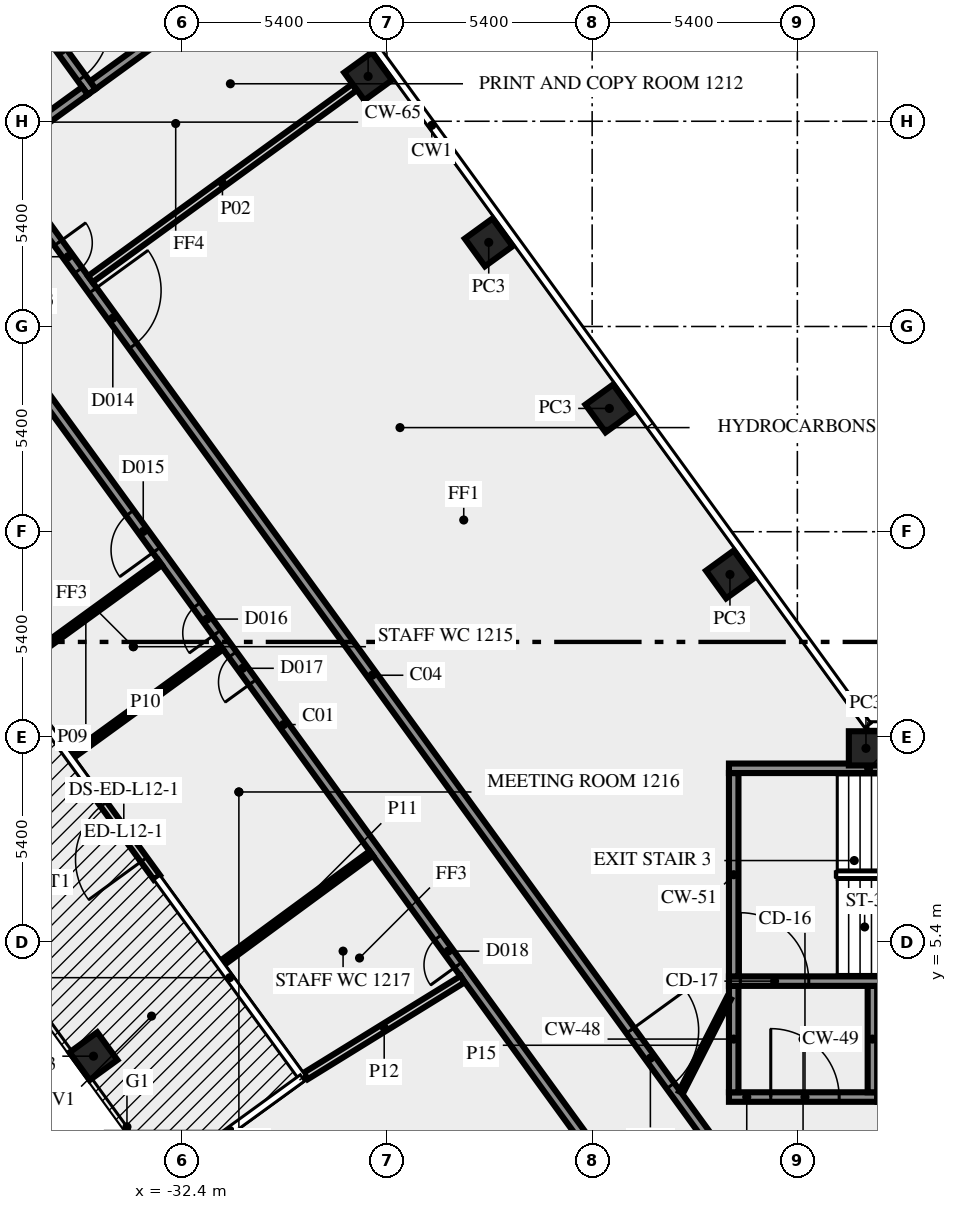
"""IFC4 building model, lengths in metres.
Left out: names, types, materials, properties, quantities, classifications, styles, units other than length and angle.
Written with IfcOpenShell. Run it as: python <this file> out.ifc"""

import sys

from ifc_helpers import new_model, si_unit, direction, frame, frame_2d, origin, origin_2d, place, context, subcontext, project, spatial, rectangle, extrude, element, fill, save


model = new_model("IFC4")
c1 = context("Model", 3, precision=1e-05, world=origin(), true_north=direction((0.0, 1.0)))
c2 = subcontext(c1, "Body", "Model", "MODEL_VIEW")
j1 = project(units=[si_unit("LENGTHUNIT", "METRE"), si_unit("PLANEANGLEUNIT", "RADIAN")], contexts=[c1])
p1 = place(None, origin())
s1 = spatial("IfcSite", under=j1, at=p1, CompositionType="ELEMENT")
p2 = place(p1, origin())
s2 = spatial("IfcBuilding", under=s1, at=p2, CompositionType="ELEMENT")
p3 = place(p2, frame((0.0, 0.0, 55.0)))
s3 = spatial("IfcBuildingStorey", under=s2, at=p3, CompositionType="ELEMENT", Elevation=55.0)
for number, where, z_axis, x_axis in (
    (1, (-17.974, 15.075, 0.0), (0.0, 0.0, 1.0), (-0.588, 0.809, 0.0)),
    (2, (-21.147, 19.444, 0.0), (0.0, 0.0, 1.0), (-0.588, 0.809, 0.0)),
    (3, (-24.321, 23.812, 0.0), (0.0, 0.0, 1.0), (-0.588, 0.809, 0.0)),
    (4, (-27.495, 28.181, 0.0), (0.0, 0.0, 1.0), (-0.588, 0.809, 0.0)),
    (5, (-34.722, 2.4, 0.0), (0.0, 0.0, 1.0), (0.588, -0.809, 0.0)),
    (6, (-14.395, 10.5, 0.0), (0.0, 0.0, 1.0), (-1.0, 0.0, 0.0)),
):
    element("IfcColumn", number, at=place(p3, frame(where, z_axis=z_axis, x_axis=x_axis)), inside=s3, PredefinedType="COLUMN", context=c2, shape_type="SweptSolid", body=[
        extrude(rectangle(XDim=0.9, YDim=0.9, at=origin_2d()), origin(), (0.0, 0.0, 1.0), 3.65),
    ])
p4 = place(p3, frame((-33.053, 7.103, 0.0), z_axis=(0.0, 0.0, 1.0), x_axis=(-0.587774760134, 0.809024617271, 0.0)))
e7 = element("IfcWall", 7, at=p4, inside=s3, PredefinedType="SOLIDWALL", context=c2, shape_type="SweptSolid", body=[
    extrude(rectangle(XDim=2.963, YDim=0.2, at=frame_2d((1.481, 0.0))), origin(), (0.0, 0.0, 1.0), 3.65),
])
p5 = place(p4, frame((0.582, 0.0, 0.0)))
e8 = element("IfcOpeningElement", 8, at=p5, cuts=e7, PredefinedType="OPENING", context=c2, shape_type="SweptSolid", body=[
    extrude(rectangle(XDim=1.8, YDim=2.4, at=frame_2d((0.9, 1.2))), frame((0.0, 0.11, 0.0), z_axis=(0.0, -1.0, 0.0), x_axis=(1.0, 0.0, 0.0)), (0.0, 0.0, 1.0), 0.22),
])
p6 = place(p3, frame((-18.0, 1.325, 0.0), z_axis=(0.0, 0.0, 1.0), x_axis=(1.0, 0.0, 0.0)))
e9 = element("IfcWall", 9, at=p6, inside=s3, PredefinedType="SHEAR", context=c2, shape_type="SweptSolid", body=[
    extrude(rectangle(XDim=3.9, YDim=0.25, at=frame_2d((1.95, 0.0))), origin(), (0.0, 0.0, 1.0), 3.65),
])
p7 = place(p6, frame((1.1, 0.0, 0.0)))
e10 = element("IfcOpeningElement", 10, at=p7, cuts=e9, PredefinedType="OPENING", context=c2, shape_type="SweptSolid", body=[
    extrude(rectangle(XDim=1.8, YDim=2.1, at=frame_2d((0.9, 1.05))), frame((0.0, 0.135, 0.0), z_axis=(0.0, -1.0, 0.0), x_axis=(1.0, 0.0, 0.0)), (0.0, 0.0, 1.0), 0.27),
])
for number, where, z_axis, x_axis in (
    (11, (-17.875, 1.45, 0.0), (0.0, 0.0, 1.0), (0.0, 1.0, 0.0)),
    (12, (-14.225, 1.45, 0.0), (0.0, 0.0, 1.0), (0.0, 1.0, 0.0)),
):
    element("IfcWall", number, at=place(p3, frame(where, z_axis=z_axis, x_axis=x_axis)), inside=s3, PredefinedType="SHEAR", context=c2, shape_type="SweptSolid", body=[
        extrude(rectangle(XDim=2.8, YDim=0.25, at=frame_2d((1.4, 0.0))), origin(), (0.0, 0.0, 1.0), 3.65),
    ])
p8 = place(p3, frame((-18.0, 4.375, 0.0), z_axis=(0.0, 0.0, 1.0), x_axis=(1.0, 0.0, 0.0)))
e13 = element("IfcWall", 13, at=p8, inside=s3, PredefinedType="SHEAR", context=c2, shape_type="SweptSolid", body=[
    extrude(rectangle(XDim=10.5, YDim=0.25, at=frame_2d((5.25, 0.0))), origin(), (0.0, 0.0, 1.0), 3.65),
])
p9 = place(p8, frame((0.3, 0.0, 0.0)))
e14 = element("IfcOpeningElement", 14, at=p9, cuts=e13, PredefinedType="OPENING", context=c2, shape_type="SweptSolid", body=[
    extrude(rectangle(XDim=1.8, YDim=2.1, at=frame_2d((0.9, 1.05))), frame((0.0, 0.135, 0.0), z_axis=(0.0, -1.0, 0.0), x_axis=(1.0, 0.0, 0.0)), (0.0, 0.0, 1.0), 0.27),
])
p10 = place(p3, frame((-17.875, 4.5, 0.0), z_axis=(0.0, 0.0, 1.0), x_axis=(0.0, 1.0, 0.0)))
e15 = element("IfcWall", 15, at=p10, inside=s3, PredefinedType="SHEAR", context=c2, shape_type="SweptSolid", body=[
    extrude(rectangle(XDim=5.35, YDim=0.25, at=frame_2d((2.675, 0.0))), origin(), (0.0, 0.0, 1.0), 3.65),
])
p11 = place(p3, frame((-18.0, 9.975, 0.0), z_axis=(0.0, 0.0, 1.0), x_axis=(1.0, 0.0, 0.0)))
e16 = element("IfcWall", 16, at=p11, inside=s3, PredefinedType="SHEAR", context=c2, shape_type="SweptSolid", body=[
    extrude(rectangle(XDim=10.5, YDim=0.25, at=frame_2d((5.25, 0.0))), origin(), (0.0, 0.0, 1.0), 3.65),
])
p12 = place(p11, frame((4.5, 0.0, 1.0)))
e17 = element("IfcOpeningElement", 17, at=p12, cuts=e16, PredefinedType="OPENING", context=c2, shape_type="SweptSolid", body=[
    extrude(rectangle(XDim=1.2, YDim=1.2, at=frame_2d((0.6, 0.6))), frame((0.0, 0.135, 0.0), z_axis=(0.0, -1.0, 0.0), x_axis=(1.0, 0.0, 0.0)), (0.0, 0.0, 1.0), 0.27),
])
p13 = place(p3, frame((-30.414, 31.092, 0.0), z_axis=(0.0, 0.0, 1.0), x_axis=(-0.8089984606, -0.587810760999, 0.0)))
e18 = element("IfcWall", 18, at=p13, inside=s3, PredefinedType="SHEAR", context=c2, shape_type="SweptSolid", body=[
    extrude(rectangle(XDim=5.35, YDim=0.25, at=frame_2d((2.675, 0.0))), origin(), (0.0, 0.0, 1.0), 3.65),
])
p14 = place(p3, frame((-40.942, 36.267, 0.0), z_axis=(0.0, 0.0, 1.0), x_axis=(0.587795589702, -0.809009483706, 0.0)))
e19 = element("IfcWall", 19, at=p14, inside=s3, PredefinedType="SHEAR", context=c2, shape_type="SweptSolid", body=[
    extrude(rectangle(XDim=10.5, YDim=0.25, at=frame_2d((5.25, 0.0))), origin(), (0.0, 0.0, 1.0), 3.65),
])
p15 = place(p14, frame((8.25, 0.0, 0.0)))
e20 = element("IfcOpeningElement", 20, at=p15, cuts=e19, PredefinedType="OPENING", context=c2, shape_type="SweptSolid", body=[
    extrude(rectangle(XDim=1.8, YDim=2.1, at=frame_2d((0.9, 1.05))), frame((0.0, 0.135, 0.0), z_axis=(0.0, -1.0, 0.0), x_axis=(1.0, 0.0, 0.0)), (0.0, 0.0, 1.0), 0.27),
])
p16 = place(p3, frame((-34.945, 27.8, 0.0), z_axis=(0.0, 0.0, 1.0), x_axis=(-0.809041377956, -0.587751689708, 0.0)))
e21 = element("IfcWall", 21, at=p16, inside=s3, PredefinedType="SHEAR", context=c2, shape_type="SweptSolid", body=[
    extrude(rectangle(XDim=2.8, YDim=0.25, at=frame_2d((1.4, 0.0))), origin(), (0.0, 0.0, 1.0), 3.65),
])
p17 = place(p3, frame((-20.531, -1.523, 0.0), z_axis=(0.0, 0.0, 1.0), x_axis=(-0.587784593204, 0.809017473231, 0.0)))
e22 = element("IfcWall", 22, at=p17, inside=s3, PredefinedType="SOLIDWALL", context=c2, shape_type="SweptSolid", body=[
    extrude(rectangle(XDim=44.67, YDim=0.25, at=frame_2d((22.335, 0.0))), origin(), (0.0, 0.0, 1.0), 3.65),
])
p18 = place(p17, frame((21.316, 0.0, 0.0)))
e23 = element("IfcOpeningElement", 23, at=p18, cuts=e22, PredefinedType="OPENING", context=c2, shape_type="SweptSolid", body=[
    extrude(rectangle(XDim=1.2, YDim=2.1, at=frame_2d((0.6, 1.05))), frame((0.0, 0.135, 0.0), z_axis=(0.0, -1.0, 0.0), x_axis=(1.0, 0.0, 0.0)), (0.0, 0.0, 1.0), 0.27),
])
p19 = place(p17, frame((17.015, 0.0, 0.0)))
e24 = element("IfcOpeningElement", 24, at=p19, cuts=e22, PredefinedType="OPENING", context=c2, shape_type="SweptSolid", body=[
    extrude(rectangle(XDim=0.9, YDim=2.1, at=frame_2d((0.45, 1.05))), frame((0.0, 0.135, 0.0), z_axis=(0.0, -1.0, 0.0), x_axis=(1.0, 0.0, 0.0)), (0.0, 0.0, 1.0), 0.27),
])
p20 = place(p17, frame((0.533, 0.0, 0.0)))
e25 = element("IfcOpeningElement", 25, at=p20, cuts=e22, PredefinedType="OPENING", context=c2, shape_type="SweptSolid", body=[
    extrude(rectangle(XDim=0.9, YDim=2.1, at=frame_2d((0.45, 1.05))), frame((0.0, 0.135, 0.0), z_axis=(0.0, -1.0, 0.0), x_axis=(1.0, 0.0, 0.0)), (0.0, 0.0, 1.0), 0.27),
])
p21 = place(p17, frame((18.616, 0.0, 0.0)))
e26 = element("IfcOpeningElement", 26, at=p21, cuts=e22, PredefinedType="OPENING", context=c2, shape_type="SweptSolid", body=[
    extrude(rectangle(XDim=0.9, YDim=2.1, at=frame_2d((0.45, 1.05))), frame((0.0, 0.135, 0.0), z_axis=(0.0, -1.0, 0.0), x_axis=(1.0, 0.0, 0.0)), (0.0, 0.0, 1.0), 0.27),
])
p22 = place(p17, frame((7.816, 0.0, 0.0)))
e27 = element("IfcOpeningElement", 27, at=p22, cuts=e22, PredefinedType="OPENING", context=c2, shape_type="SweptSolid", body=[
    extrude(rectangle(XDim=0.9, YDim=2.1, at=frame_2d((0.45, 1.05))), frame((0.0, 0.135, 0.0), z_axis=(0.0, -1.0, 0.0), x_axis=(1.0, 0.0, 0.0)), (0.0, 0.0, 1.0), 0.27),
])
p23 = place(p3, frame((-37.232, 25.972, 0.0), z_axis=(0.0, 0.0, 1.0), x_axis=(0.587786323093, -0.809016216391, 0.0)))
e28 = element("IfcWall", 28, at=p23, inside=s3, PredefinedType="SOLIDWALL", context=c2, shape_type="SweptSolid", body=[
    extrude(rectangle(XDim=33.493, YDim=0.25, at=frame_2d((16.747, 0.0))), origin(), (0.0, 0.0, 1.0), 3.65),
])
p24 = place(p23, frame((28.301, 0.0, 0.0)))
e29 = element("IfcOpeningElement", 29, at=p24, cuts=e28, PredefinedType="OPENING", context=c2, shape_type="SweptSolid", body=[
    extrude(rectangle(XDim=1.8, YDim=2.1, at=frame_2d((0.9, 1.05))), frame((0.0, 0.135, 0.0), z_axis=(0.0, -1.0, 0.0), x_axis=(1.0, 0.0, 0.0)), (0.0, 0.0, 1.0), 0.27),
])
p25 = place(p23, frame((4.235, 0.0, 0.0)))
e30 = element("IfcOpeningElement", 30, at=p25, cuts=e28, PredefinedType="OPENING", context=c2, shape_type="SweptSolid", body=[
    extrude(rectangle(XDim=1.8, YDim=2.1, at=frame_2d((0.9, 1.05))), frame((0.0, 0.135, 0.0), z_axis=(0.0, -1.0, 0.0), x_axis=(1.0, 0.0, 0.0)), (0.0, 0.0, 1.0), 0.27),
])
p26 = place(p23, frame((2.685, 0.0, 0.0)))
e31 = element("IfcOpeningElement", 31, at=p26, cuts=e28, PredefinedType="OPENING", context=c2, shape_type="SweptSolid", body=[
    extrude(rectangle(XDim=0.9, YDim=2.1, at=frame_2d((0.45, 1.05))), frame((0.0, 0.135, 0.0), z_axis=(0.0, -1.0, 0.0), x_axis=(1.0, 0.0, 0.0)), (0.0, 0.0, 1.0), 0.27),
])
p27 = place(p3, frame((-27.851, 27.897, 0.0), z_axis=(0.0, 0.0, 1.0), x_axis=(-0.809030728677, -0.587766348183, 0.0)))
e32 = element("IfcWall", 32, at=p27, inside=s3, PredefinedType="SOLIDWALL", context=c2, shape_type="SweptSolid", body=[
    extrude(rectangle(XDim=8.596, YDim=0.2, at=frame_2d((4.298, 0.0))), origin(), (0.0, 0.0, 1.0), 3.65),
])
p28 = place(p3, frame((-36.88, 12.539, 0.0), z_axis=(0.0, 0.0, 1.0), x_axis=(0.809072133835, 0.58770935185, 0.0)))
e33 = element("IfcWall", 33, at=p28, inside=s3, PredefinedType="PARTITIONING", context=c2, shape_type="SweptSolid", body=[
    extrude(rectangle(XDim=4.836, YDim=0.15, at=frame_2d((2.418, 0.0))), origin(), (0.0, 0.0, 1.0), 3.65),
])
p29 = place(p3, frame((-31.356, 13.164, 0.0), z_axis=(0.0, 0.0, 1.0), x_axis=(-0.809191339455, -0.587545212006, 0.0)))
e34 = element("IfcWall", 34, at=p29, inside=s3, PredefinedType="PARTITIONING", context=c2, shape_type="SweptSolid", body=[
    extrude(rectangle(XDim=4.937, YDim=0.15, at=frame_2d((2.468, 0.0))), origin(), (0.0, 0.0, 1.0), 3.65),
])
p30 = place(p3, frame((-31.391, 4.813, 0.0), z_axis=(0.0, 0.0, 1.0), x_axis=(0.805925155422, 0.592017435434, 0.0)))
e35 = element("IfcWall", 35, at=p30, inside=s3, PredefinedType="PARTITIONING", context=c2, shape_type="SweptSolid", body=[
    extrude(rectangle(XDim=4.936, YDim=0.15, at=frame_2d((2.468, 0.0))), origin(), (0.0, 0.0, 1.0), 3.65),
])
p31 = place(p3, frame((-25.008, 4.427, 0.0), z_axis=(0.0, 0.0, 1.0), x_axis=(-0.850959437964, -0.525231410847, 0.0)))
e36 = element("IfcWall", 36, at=p31, inside=s3, PredefinedType="SOLIDWALL", context=c2, shape_type="SweptSolid", body=[
    extrude(rectangle(XDim=4.851, YDim=0.2, at=frame_2d((2.425, 0.0))), origin(), (0.0, 0.0, 1.0), 3.65),
])
p32 = place(p3, frame((-19.261, 1.45, 0.0), z_axis=(0.0, 0.0, 1.0), x_axis=(0.453950796792, 0.891026752736, 0.0)))
e37 = element("IfcWall", 37, at=p32, inside=s3, PredefinedType="PARTITIONING", context=c2, shape_type="SweptSolid", body=[
    extrude(rectangle(XDim=2.778, YDim=0.12, at=frame_2d((1.389, 0.0))), origin(), (0.0, 0.0, 1.0), 3.65),
])
p33 = place(p5, origin())
e38 = element("IfcDoor", 38, at=p33, inside=s3, OperationType="DOUBLE_DOOR_SINGLE_SWING", PredefinedType="DOOR", context=c2, shape_type="SweptSolid", body=[
    extrude(rectangle(XDim=1.8, YDim=2.4, at=frame_2d((0.9, 1.2))), frame((0.0, 0.025, 0.0), z_axis=(0.0, -1.0, 0.0), x_axis=(1.0, 0.0, 0.0)), (0.0, 0.0, 1.0), 0.05),
])
fill(e8, e38)
p34 = place(p7, origin())
e39 = element("IfcDoor", 39, at=p34, inside=s3, OperationType="DOUBLE_DOOR_SINGLE_SWING", PredefinedType="DOOR", context=c2, shape_type="SweptSolid", body=[
    extrude(rectangle(XDim=1.8, YDim=2.1, at=frame_2d((0.9, 1.05))), frame((0.0, 0.025, 0.0), z_axis=(0.0, -1.0, 0.0), x_axis=(1.0, 0.0, 0.0)), (0.0, 0.0, 1.0), 0.05),
])
fill(e10, e39)
p35 = place(p9, origin())
e40 = element("IfcDoor", 40, at=p35, inside=s3, OperationType="DOUBLE_DOOR_SINGLE_SWING", PredefinedType="DOOR", context=c2, shape_type="SweptSolid", body=[
    extrude(rectangle(XDim=1.8, YDim=2.1, at=frame_2d((0.9, 1.05))), frame((0.0, 0.025, 0.0), z_axis=(0.0, -1.0, 0.0), x_axis=(1.0, 0.0, 0.0)), (0.0, 0.0, 1.0), 0.05),
])
fill(e14, e40)
p36 = place(p15, origin())
e41 = element("IfcDoor", 41, at=p36, inside=s3, OperationType="DOUBLE_DOOR_SINGLE_SWING", PredefinedType="DOOR", context=c2, shape_type="SweptSolid", body=[
    extrude(rectangle(XDim=1.8, YDim=2.1, at=frame_2d((0.9, 1.05))), frame((0.0, 0.025, 0.0), z_axis=(0.0, -1.0, 0.0), x_axis=(1.0, 0.0, 0.0)), (0.0, 0.0, 1.0), 0.05),
])
fill(e20, e41)
p37 = place(p24, origin())
e42 = element("IfcDoor", 42, at=p37, inside=s3, OperationType="DOUBLE_DOOR_SINGLE_SWING", PredefinedType="DOOR", context=c2, shape_type="SweptSolid", body=[
    extrude(rectangle(XDim=1.8, YDim=2.1, at=frame_2d((0.9, 1.05))), frame((0.0, 0.025, 0.0), z_axis=(0.0, -1.0, 0.0), x_axis=(1.0, 0.0, 0.0)), (0.0, 0.0, 1.0), 0.05),
])
fill(e29, e42)
p38 = place(p25, origin())
e43 = element("IfcDoor", 43, at=p38, inside=s3, OperationType="DOUBLE_DOOR_SINGLE_SWING", PredefinedType="DOOR", context=c2, shape_type="SweptSolid", body=[
    extrude(rectangle(XDim=1.8, YDim=2.1, at=frame_2d((0.9, 1.05))), frame((0.0, 0.025, 0.0), z_axis=(0.0, -1.0, 0.0), x_axis=(1.0, 0.0, 0.0)), (0.0, 0.0, 1.0), 0.05),
])
fill(e30, e43)
p39 = place(p18, origin())
e44 = element("IfcDoor", 44, at=p39, inside=s3, OperationType="SINGLE_SWING_LEFT", PredefinedType="DOOR", context=c2, shape_type="SweptSolid", body=[
    extrude(rectangle(XDim=1.2, YDim=2.1, at=frame_2d((0.6, 1.05))), frame((0.0, 0.025, 0.0), z_axis=(0.0, -1.0, 0.0), x_axis=(1.0, 0.0, 0.0)), (0.0, 0.0, 1.0), 0.05),
])
fill(e23, e44)
p40 = place(p19, origin())
e45 = element("IfcDoor", 45, at=p40, inside=s3, OperationType="SINGLE_SWING_RIGHT", PredefinedType="DOOR", context=c2, shape_type="SweptSolid", body=[
    extrude(rectangle(XDim=0.9, YDim=2.1, at=frame_2d((0.45, 1.05))), frame((0.0, 0.025, 0.0), z_axis=(0.0, -1.0, 0.0), x_axis=(1.0, 0.0, 0.0)), (0.0, 0.0, 1.0), 0.05),
])
fill(e24, e45)
p41 = place(p26, origin())
e46 = element("IfcDoor", 46, at=p41, inside=s3, OperationType="SINGLE_SWING_RIGHT", PredefinedType="DOOR", context=c2, shape_type="SweptSolid", body=[
    extrude(rectangle(XDim=0.9, YDim=2.1, at=frame_2d((0.45, 1.05))), frame((0.0, 0.025, 0.0), z_axis=(0.0, -1.0, 0.0), x_axis=(1.0, 0.0, 0.0)), (0.0, 0.0, 1.0), 0.05),
])
fill(e31, e46)
p42 = place(p21, origin())
e47 = element("IfcDoor", 47, at=p42, inside=s3, OperationType="SINGLE_SWING_LEFT", PredefinedType="DOOR", context=c2, shape_type="SweptSolid", body=[
    extrude(rectangle(XDim=0.9, YDim=2.1, at=frame_2d((0.45, 1.05))), frame((0.0, 0.025, 0.0), z_axis=(0.0, -1.0, 0.0), x_axis=(1.0, 0.0, 0.0)), (0.0, 0.0, 1.0), 0.05),
])
fill(e26, e47)
p43 = place(p22, origin())
e48 = element("IfcDoor", 48, at=p43, inside=s3, OperationType="SINGLE_SWING_LEFT", PredefinedType="DOOR", context=c2, shape_type="SweptSolid", body=[
    extrude(rectangle(XDim=0.9, YDim=2.1, at=frame_2d((0.45, 1.05))), frame((0.0, 0.025, 0.0), z_axis=(0.0, -1.0, 0.0), x_axis=(1.0, 0.0, 0.0)), (0.0, 0.0, 1.0), 0.05),
])
fill(e27, e48)
save(model, sys.argv[1])
